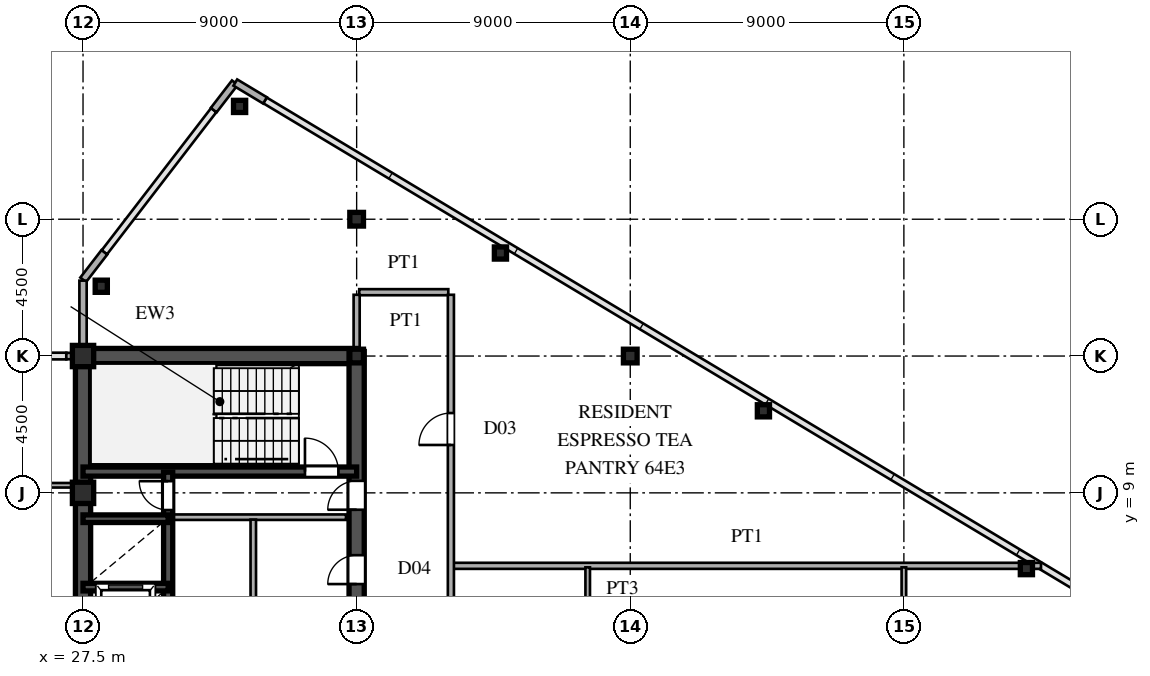
"""IFC4 building model, lengths in metres.
Left out: names, types, materials, properties, quantities, classifications, styles, units other than length and angle.
Written with IfcOpenShell. Run it as: python <this file> out.ifc"""

import sys

from ifc_helpers import new_model, si_unit, direction, frame, frame_2d, origin, origin_2d, place, context, subcontext, project, spatial, rectangle, hollow_rectangle, i_section, extrude, source, transform, mapped, element, fill, save


model = new_model("IFC4")
c1 = context("Model", 3, precision=1e-05, world=origin(), true_north=direction((0.0, 1.0)))
c2 = subcontext(c1, "Body", "Model", "MODEL_VIEW")
j1 = project(units=[si_unit("LENGTHUNIT", "METRE"), si_unit("PLANEANGLEUNIT", "RADIAN")], contexts=[c1])
p1 = place(None, origin())
s1 = spatial("IfcSite", under=j1, at=p1, CompositionType="ELEMENT")
p2 = place(p1, origin())
s2 = spatial("IfcBuilding", under=s1, at=p2, CompositionType="ELEMENT")
p3 = place(p2, frame((0.0, 0.0, 243.15)))
s3 = spatial("IfcBuildingStorey", under=s2, at=p3, CompositionType="ELEMENT", Elevation=243.15)
m1 = source(origin(), c2, "Body", "SweptSolid", [
    extrude(hollow_rectangle(XDim=0.7, YDim=0.7, WallThickness=0.03, at=origin_2d()), origin(), (0.0, 0.0, 1.0), 3.75),
])
for number, where, z_axis, x_axis in (
    (1, (27.5, 9.0, 0.0), (0.0, 0.0, 1.0), (1.0, 0.0, 0.0)),
    (2, (27.5, 13.5, 0.0), (0.0, 0.0, 1.0), (1.0, 0.0, 0.0)),
):
    element("IfcColumn", number, at=place(p3, frame(where, z_axis=z_axis, x_axis=x_axis)), inside=s3, PredefinedType="COLUMN", context=c2, shape_type="MappedRepresentation", body=[
        mapped(m1, transform((0.0, 0.0, 0.0), scale=1.0)),
    ])
m2 = source(origin(), c2, "Body", "SweptSolid", [
    extrude(i_section(OverallWidth=0.45, OverallDepth=0.45, WebThickness=0.016, FlangeThickness=0.025, at=origin_2d()), origin(), (0.0, 0.0, 1.0), 3.75),
])
for number, where, z_axis, x_axis in (
    (3, (36.5, 13.5, 0.0), (0.0, 0.0, 1.0), (1.0, 0.0, 0.0)),
    (4, (36.5, 18.0, 0.0), (0.0, 0.0, 1.0), (1.0, 0.0, 0.0)),
    (5, (45.5, 13.5, 0.0), (0.0, 0.0, 1.0), (1.0, 0.0, 0.0)),
):
    element("IfcColumn", number, at=place(p3, frame(where, z_axis=z_axis, x_axis=x_axis)), inside=s3, PredefinedType="COLUMN", context=c2, shape_type="MappedRepresentation", body=[
        mapped(m2, transform((0.0, 0.0, 0.0), scale=1.0)),
    ])
m3 = source(origin(), c2, "Body", "SweptSolid", [
    extrude(hollow_rectangle(XDim=0.4, YDim=0.4, WallThickness=0.016, at=origin_2d()), origin(), (0.0, 0.0, 1.0), 3.75),
])
for number, where, z_axis, x_axis in (
    (6, (32.65, 21.71, 0.0), (0.0, 0.0, 1.0), (1.0, 0.0, 0.0)),
    (7, (28.1, 15.796, 0.0), (0.0, 0.0, 1.0), (1.0, 0.0, 0.0)),
    (8, (41.23, 16.889, 0.0), (0.0, 0.0, 1.0), (1.0, 0.0, 0.0)),
    (9, (49.88, 11.699, 0.0), (0.0, 0.0, 1.0), (1.0, 0.0, 0.0)),
    (10, (58.53, 6.509, 0.0), (0.0, 0.0, 1.0), (1.0, 0.0, 0.0)),
):
    element("IfcColumn", number, at=place(p3, frame(where, z_axis=z_axis, x_axis=x_axis)), inside=s3, PredefinedType="COLUMN", context=c2, shape_type="MappedRepresentation", body=[
        mapped(m3, transform((0.0, 0.0, 0.0), scale=1.0)),
    ])
for number, where, z_axis, x_axis in (
    (11, (33.486, 21.908, 0.0), (0.0, 0.0, 1.0), (-0.857, 0.515, 0.0)),
    (12, (32.494, 22.492, 0.0), (0.0, 0.0, 1.0), (-0.61, -0.793, 0.0)),
    (13, (28.201, 16.912, 0.0), (0.0, 0.0, 1.0), (-0.61, -0.793, 0.0)),
):
    element("IfcWall", number, at=place(p3, frame(where, z_axis=z_axis, x_axis=x_axis)), inside=s3, PredefinedType="SOLIDWALL", context=c2, shape_type="SweptSolid", body=[
        extrude(rectangle(XDim=1.14, YDim=0.24, at=frame_2d((0.57, 0.0))), origin(), (0.0, 0.0, 1.0), 3.53),
    ])
p4 = place(p3, frame((27.5, 13.755, 0.0), z_axis=(0.0, 0.0, 1.0), x_axis=(0.0, 1.0, 0.0)))
e14 = element("IfcWall", 14, at=p4, inside=s3, PredefinedType="SOLIDWALL", context=c2, shape_type="SweptSolid", body=[
    extrude(rectangle(XDim=0.62, YDim=0.24, at=frame_2d((0.31, 0.0))), origin(), (0.0, 0.0, 1.0), 3.03),
])
p5 = place(p3, frame((27.5, 14.375, 0.0), z_axis=(0.0, 0.0, 1.0), x_axis=(0.0, 1.0, 0.0)))
e15 = element("IfcWall", 15, at=p5, inside=s3, PredefinedType="SOLIDWALL", context=c2, shape_type="SweptSolid", body=[
    extrude(rectangle(XDim=1.605, YDim=0.24, at=frame_2d((0.803, 0.0))), origin(), (0.0, 0.0, 1.0), 3.53),
])
p6 = place(p3, frame((26.95, 13.5, 0.0), z_axis=(0.0, 0.0, 1.0), x_axis=(1.0, 0.0, 0.0)))
e16 = element("IfcWall", 16, at=p6, inside=s3, PredefinedType="SOLIDWALL", context=c2, shape_type="SweptSolid", body=[
    extrude(rectangle(XDim=0.54, YDim=0.21, at=frame_2d((0.27, 0.0))), origin(), (0.0, 0.0, 1.0), 3.03),
])
p7 = place(p3, frame((27.5, 1.3, 0.0), z_axis=(0.0, 0.0, 1.0), x_axis=(0.0, 1.0, 0.0)))
e17 = element("IfcWall", 17, at=p7, inside=s3, PredefinedType="SHEAR", context=c2, shape_type="SweptSolid", body=[
    extrude(rectangle(XDim=12.2, YDim=0.5, at=frame_2d((6.1, 0.0))), origin(), (0.0, 0.0, 1.0), 3.53),
])
p8 = place(p3, frame((27.5, 13.5, 0.0), z_axis=(0.0, 0.0, 1.0), x_axis=(1.0, 0.0, 0.0)))
e18 = element("IfcWall", 18, at=p8, inside=s3, PredefinedType="SHEAR", context=c2, shape_type="SweptSolid", body=[
    extrude(rectangle(XDim=9.0, YDim=0.5, at=frame_2d((4.5, 0.0))), origin(), (0.0, 0.0, 1.0), 3.53),
])
p9 = place(p3, frame((36.5, 8.2, 0.0), z_axis=(0.0, 0.0, 1.0), x_axis=(0.0, 1.0, 0.0)))
e19 = element("IfcWall", 19, at=p9, inside=s3, PredefinedType="SHEAR", context=c2, shape_type="SweptSolid", body=[
    extrude(rectangle(XDim=5.45, YDim=0.5, at=frame_2d((2.725, 0.0))), origin(), (0.0, 0.0, 1.0), 3.53),
])
p10 = place(p9, frame((0.245, 0.0, 0.0)))
e20 = element("IfcOpeningElement", 20, at=p10, cuts=e19, PredefinedType="OPENING", context=c2, shape_type="SweptSolid", body=[
    extrude(rectangle(XDim=0.95, YDim=2.15, at=frame_2d((0.475, 1.075))), frame((0.0, 0.26, 0.0), z_axis=(0.0, -1.0, 0.0), x_axis=(1.0, 0.0, 0.0)), (0.0, 0.0, 1.0), 0.52),
])
p11 = place(p3, frame((36.5, 4.75, 0.0), z_axis=(0.0, 0.0, 1.0), x_axis=(0.0, 1.0, 0.0)))
e21 = element("IfcWall", 21, at=p11, inside=s3, PredefinedType="SHEAR", context=c2, shape_type="SweptSolid", body=[
    extrude(rectangle(XDim=3.45, YDim=0.5, at=frame_2d((1.725, 0.0))), origin(), (0.0, 0.0, 1.0), 3.53),
])
p12 = place(p11, frame((1.25, 0.0, 0.0)))
e22 = element("IfcOpeningElement", 22, at=p12, cuts=e21, PredefinedType="OPENING", context=c2, shape_type="SweptSolid", body=[
    extrude(rectangle(XDim=0.95, YDim=2.15, at=frame_2d((0.475, 1.075))), frame((0.0, 0.26, 0.0), z_axis=(0.0, -1.0, 0.0), x_axis=(1.0, 0.0, 0.0)), (0.0, 0.0, 1.0), 0.52),
])
p13 = place(p3, frame((27.5, 9.7, 0.0), z_axis=(0.0, 0.0, 1.0), x_axis=(1.0, 0.0, 0.0)))
e23 = element("IfcWall", 23, at=p13, inside=s3, PredefinedType="SHEAR", context=c2, shape_type="SweptSolid", body=[
    extrude(rectangle(XDim=9.0, YDim=0.3, at=frame_2d((4.5, 0.0))), origin(), (0.0, 0.0, 1.0), 3.53),
])
p14 = place(p13, frame((7.3, 0.0, 0.0)))
e24 = element("IfcOpeningElement", 24, at=p14, cuts=e23, PredefinedType="OPENING", context=c2, shape_type="SweptSolid", body=[
    extrude(rectangle(XDim=1.1, YDim=2.2, at=frame_2d((0.55, 1.1))), frame((0.0, 0.16, 0.0), z_axis=(0.0, -1.0, 0.0), x_axis=(1.0, 0.0, 0.0)), (0.0, 0.0, 1.0), 0.32),
])
for number, where, z_axis, x_axis in (
    (25, (27.5, 5.9, 0.0), (0.0, 0.0, 1.0), (1.0, 0.0, 0.0)),
    (26, (27.5, 8.15, 0.0), (0.0, 0.0, 1.0), (1.0, 0.0, 0.0)),
):
    element("IfcWall", number, at=place(p3, frame(where, z_axis=z_axis, x_axis=x_axis)), inside=s3, PredefinedType="SHEAR", context=c2, shape_type="SweptSolid", body=[
        extrude(rectangle(XDim=2.8, YDim=0.25, at=frame_2d((1.4, 0.0))), origin(), (0.0, 0.0, 1.0), 3.53),
    ])
p15 = place(p3, frame((30.3, 3.6, 0.0), z_axis=(0.0, 0.0, 1.0), x_axis=(0.0, 1.0, 0.0)))
e27 = element("IfcWall", 27, at=p15, inside=s3, PredefinedType="SHEAR", context=c2, shape_type="SweptSolid", body=[
    extrude(rectangle(XDim=2.3, YDim=0.3, at=frame_2d((1.15, 0.0))), origin(), (0.0, 0.0, 1.0), 3.53),
])
p16 = place(p15, frame((0.6, 0.0, 0.0)))
e28 = element("IfcOpeningElement", 28, at=p16, cuts=e27, PredefinedType="OPENING", context=c2, shape_type="SweptSolid", body=[
    extrude(rectangle(XDim=1.1, YDim=2.2, at=frame_2d((0.55, 1.1))), frame((0.0, 0.16, 0.0), z_axis=(0.0, -1.0, 0.0), x_axis=(1.0, 0.0, 0.0)), (0.0, 0.0, 1.0), 0.32),
])
p17 = place(p3, frame((30.3, 5.9, 0.0), z_axis=(0.0, 0.0, 1.0), x_axis=(0.0, 1.0, 0.0)))
e29 = element("IfcWall", 29, at=p17, inside=s3, PredefinedType="SHEAR", context=c2, shape_type="SweptSolid", body=[
    extrude(rectangle(XDim=2.25, YDim=0.3, at=frame_2d((1.125, 0.0))), origin(), (0.0, 0.0, 1.0), 3.53),
])
p18 = place(p3, frame((30.3, 8.15, 0.0), z_axis=(0.0, 0.0, 1.0), x_axis=(0.0, 1.0, 0.0)))
e30 = element("IfcWall", 30, at=p18, inside=s3, PredefinedType="SHEAR", context=c2, shape_type="SweptSolid", body=[
    extrude(rectangle(XDim=1.53, YDim=0.3, at=frame_2d((0.765, 0.0))), origin(), (0.0, 0.0, 1.0), 3.53),
])
p19 = place(p18, frame((0.285, 0.0, 0.0)))
e31 = element("IfcOpeningElement", 31, at=p19, cuts=e30, PredefinedType="OPENING", context=c2, shape_type="SweptSolid", body=[
    extrude(rectangle(XDim=0.95, YDim=2.15, at=frame_2d((0.475, 1.075))), frame((0.0, 0.16, 0.0), z_axis=(0.0, -1.0, 0.0), x_axis=(1.0, 0.0, 0.0)), (0.0, 0.0, 1.0), 0.32),
])
p20 = place(p3, frame((30.45, 8.2, 0.0), z_axis=(0.0, 0.0, 1.0), x_axis=(1.0, 0.0, 0.0)))
e32 = element("IfcWall", 32, at=p20, inside=s3, PredefinedType="PARTITIONING", context=c2, shape_type="SweptSolid", body=[
    extrude(rectangle(XDim=5.7, YDim=0.18, at=frame_2d((2.85, 0.0))), origin(), (0.0, 0.0, 1.0), 3.53),
])
p21 = place(p3, frame((33.1, 1.38, 0.0), z_axis=(0.0, 0.0, 1.0), x_axis=(0.0, 1.0, 0.0)))
e33 = element("IfcWall", 33, at=p21, inside=s3, PredefinedType="PARTITIONING", context=c2, shape_type="SweptSolid", body=[
    extrude(rectangle(XDim=6.74, YDim=0.18, at=frame_2d((3.37, 0.0))), origin(), (0.0, 0.0, 1.0), 3.53),
])
p22 = place(p3, frame((39.68, 6.6, 0.0), z_axis=(0.0, 0.0, 1.0), x_axis=(1.0, 0.0, 0.0)))
e34 = element("IfcWall", 34, at=p22, inside=s3, PredefinedType="PARTITIONING", context=c2, shape_type="SweptSolid", body=[
    extrude(rectangle(XDim=19.33, YDim=0.2, at=frame_2d((9.665, 0.0))), origin(), (0.0, 0.0, 1.0), 3.53),
])
p23 = place(p3, frame((5.585, 9.25, 0.0), z_axis=(0.0, 0.0, 1.0), x_axis=(1.0, 0.0, 0.0)))
e35 = element("IfcWall", 35, at=p23, inside=s3, PredefinedType="PARTITIONING", context=c2, shape_type="SweptSolid", body=[
    extrude(rectangle(XDim=21.66, YDim=0.15, at=frame_2d((10.83, 0.0))), origin(), (0.0, 0.0, 1.0), 3.53),
])
p24 = place(p23, frame((3.94, 0.0, 0.0)))
e36 = element("IfcOpeningElement", 36, at=p24, cuts=e35, PredefinedType="OPENING", context=c2, shape_type="SweptSolid", body=[
    extrude(rectangle(XDim=0.95, YDim=2.15, at=frame_2d((0.475, 1.075))), frame((0.0, 0.085, 0.0), z_axis=(0.0, -1.0, 0.0), x_axis=(1.0, 0.0, 0.0)), (0.0, 0.0, 1.0), 0.17),
])
p25 = place(p23, frame((11.69, 0.0, 0.0)))
e37 = element("IfcOpeningElement", 37, at=p25, cuts=e35, PredefinedType="OPENING", context=c2, shape_type="SweptSolid", body=[
    extrude(rectangle(XDim=0.95, YDim=2.15, at=frame_2d((0.475, 1.075))), frame((0.0, 0.085, 0.0), z_axis=(0.0, -1.0, 0.0), x_axis=(1.0, 0.0, 0.0)), (0.0, 0.0, 1.0), 0.17),
])
p26 = place(p23, frame((18.19, 0.0, 0.0)))
e38 = element("IfcOpeningElement", 38, at=p26, cuts=e35, PredefinedType="OPENING", context=c2, shape_type="SweptSolid", body=[
    extrude(rectangle(XDim=0.95, YDim=2.15, at=frame_2d((0.475, 1.075))), frame((0.0, 0.085, 0.0), z_axis=(0.0, -1.0, 0.0), x_axis=(1.0, 0.0, 0.0)), (0.0, 0.0, 1.0), 0.17),
])
p27 = place(p3, frame((36.585, 15.6, 0.0), z_axis=(0.0, 0.0, 1.0), x_axis=(1.0, 0.0, 0.0)))
e39 = element("IfcWall", 39, at=p27, inside=s3, PredefinedType="PARTITIONING", context=c2, shape_type="SweptSolid", body=[
    extrude(rectangle(XDim=2.93, YDim=0.2, at=frame_2d((1.465, 0.0))), origin(), (0.0, 0.0, 1.0), 3.53),
])
p28 = place(p3, frame((36.5, 13.755, 0.0), z_axis=(0.0, 0.0, 1.0), x_axis=(0.0, 1.0, 0.0)))
e40 = element("IfcWall", 40, at=p28, inside=s3, PredefinedType="PARTITIONING", context=c2, shape_type="SweptSolid", body=[
    extrude(rectangle(XDim=1.76, YDim=0.2, at=frame_2d((0.88, 0.0))), origin(), (0.0, 0.0, 1.0), 2.93),
])
p29 = place(p3, frame((39.6, -15.515, 0.0), z_axis=(0.0, 0.0, 1.0), x_axis=(0.0, 1.0, 0.0)))
e41 = element("IfcWall", 41, at=p29, inside=s3, PredefinedType="PARTITIONING", context=c2, shape_type="SweptSolid", body=[
    extrude(rectangle(XDim=31.03, YDim=0.2, at=frame_2d((15.515, 0.0))), origin(), (0.0, 0.0, 1.0), 3.53),
])
p30 = place(p29, frame((4.09, 0.0, 0.0)))
e42 = element("IfcOpeningElement", 42, at=p30, cuts=e41, PredefinedType="OPENING", context=c2, shape_type="SweptSolid", body=[
    extrude(rectangle(XDim=1.05, YDim=2.25, at=frame_2d((0.525, 1.125))), frame((0.0, 0.11, 0.0), z_axis=(0.0, -1.0, 0.0), x_axis=(1.0, 0.0, 0.0)), (0.0, 0.0, 1.0), 0.22),
])
p31 = place(p29, frame((14.998, 0.0, 0.0)))
e43 = element("IfcOpeningElement", 43, at=p31, cuts=e41, PredefinedType="OPENING", context=c2, shape_type="SweptSolid", body=[
    extrude(rectangle(XDim=1.05, YDim=2.25, at=frame_2d((0.525, 1.125))), frame((0.0, 0.11, 0.0), z_axis=(0.0, -1.0, 0.0), x_axis=(1.0, 0.0, 0.0)), (0.0, 0.0, 1.0), 0.22),
])
p32 = place(p29, frame((26.09, 0.0, 0.0)))
e44 = element("IfcOpeningElement", 44, at=p32, cuts=e41, PredefinedType="OPENING", context=c2, shape_type="SweptSolid", body=[
    extrude(rectangle(XDim=1.05, YDim=2.25, at=frame_2d((0.525, 1.125))), frame((0.0, 0.11, 0.0), z_axis=(0.0, -1.0, 0.0), x_axis=(1.0, 0.0, 0.0)), (0.0, 0.0, 1.0), 0.22),
])
p33 = place(p3, frame((44.1, 2.812, 0.0), z_axis=(0.0, 0.0, 1.0), x_axis=(0.0, 1.0, 0.0)))
e45 = element("IfcWall", 45, at=p33, inside=s3, PredefinedType="PARTITIONING", context=c2, shape_type="SweptSolid", body=[
    extrude(rectangle(XDim=3.738, YDim=0.15, at=frame_2d((1.869, 0.0))), origin(), (0.0, 0.0, 1.0), 3.53),
])
p34 = place(p3, frame((54.5, -6.15, 0.0), z_axis=(0.0, 0.0, 1.0), x_axis=(0.0, 1.0, 0.0)))
e46 = element("IfcWall", 46, at=p34, inside=s3, PredefinedType="PARTITIONING", context=c2, shape_type="SweptSolid", body=[
    extrude(rectangle(XDim=12.7, YDim=0.15, at=frame_2d((6.35, 0.0))), origin(), (0.0, 0.0, 1.0), 2.93),
])
p35 = place(p34, frame((5.875, 0.0, 0.0)))
e47 = element("IfcOpeningElement", 47, at=p35, cuts=e46, PredefinedType="OPENING", context=c2, shape_type="SweptSolid", body=[
    extrude(rectangle(XDim=0.95, YDim=2.15, at=frame_2d((0.475, 1.075))), frame((0.0, 0.085, 0.0), z_axis=(0.0, -1.0, 0.0), x_axis=(1.0, 0.0, 0.0)), (0.0, 0.0, 1.0), 0.17),
])
m4 = source(origin(), c2, "Body", "SweptSolid", [
    extrude(rectangle(XDim=0.95, YDim=2.15, at=frame_2d((0.475, 1.075))), frame((0.0, 0.025, 0.0), z_axis=(0.0, -1.0, 0.0), x_axis=(1.0, 0.0, 0.0)), (0.0, 0.0, 1.0), 0.05),
])
p36 = place(p10, origin())
e48 = element("IfcDoor", 48, at=p36, inside=s3, OperationType="SINGLE_SWING_LEFT", PredefinedType="DOOR", context=c2, shape_type="MappedRepresentation", body=[
    mapped(m4, transform((0.0, 0.0, 0.0), scale=1.0)),
])
fill(e20, e48)
p37 = place(p12, origin())
e49 = element("IfcDoor", 49, at=p37, inside=s3, OperationType="SINGLE_SWING_LEFT", PredefinedType="DOOR", context=c2, shape_type="MappedRepresentation", body=[
    mapped(m4, transform((0.0, 0.0, 0.0), scale=1.0)),
])
fill(e22, e49)
m5 = source(origin(), c2, "Body", "SweptSolid", [
    extrude(rectangle(XDim=1.1, YDim=2.2, at=frame_2d((0.55, 1.1))), frame((0.0, 0.025, 0.0), z_axis=(0.0, -1.0, 0.0), x_axis=(1.0, 0.0, 0.0)), (0.0, 0.0, 1.0), 0.05),
])
p38 = place(p14, origin())
e50 = element("IfcDoor", 50, at=p38, inside=s3, OperationType="SINGLE_SWING_LEFT", PredefinedType="DOOR", context=c2, shape_type="MappedRepresentation", body=[
    mapped(m5, transform((0.0, 0.0, 0.0), scale=1.0)),
])
fill(e24, e50)
p39 = place(p19, origin())
e51 = element("IfcDoor", 51, at=p39, inside=s3, OperationType="SINGLE_SWING_RIGHT", PredefinedType="DOOR", context=c2, shape_type="MappedRepresentation", body=[
    mapped(m4, transform((0.0, 0.0, 0.0), scale=1.0)),
])
fill(e31, e51)
m6 = source(origin(), c2, "Body", "SweptSolid", [
    extrude(rectangle(XDim=1.05, YDim=2.25, at=frame_2d((0.525, 1.125))), frame((0.0, 0.025, 0.0), z_axis=(0.0, -1.0, 0.0), x_axis=(1.0, 0.0, 0.0)), (0.0, 0.0, 1.0), 0.05),
])
p40 = place(p32, origin())
e52 = element("IfcDoor", 52, at=p40, inside=s3, OperationType="SINGLE_SWING_LEFT", PredefinedType="DOOR", context=c2, shape_type="MappedRepresentation", body=[
    mapped(m6, transform((0.0, 0.0, 0.0), scale=1.0)),
])
fill(e44, e52)
save(model, sys.argv[1])
